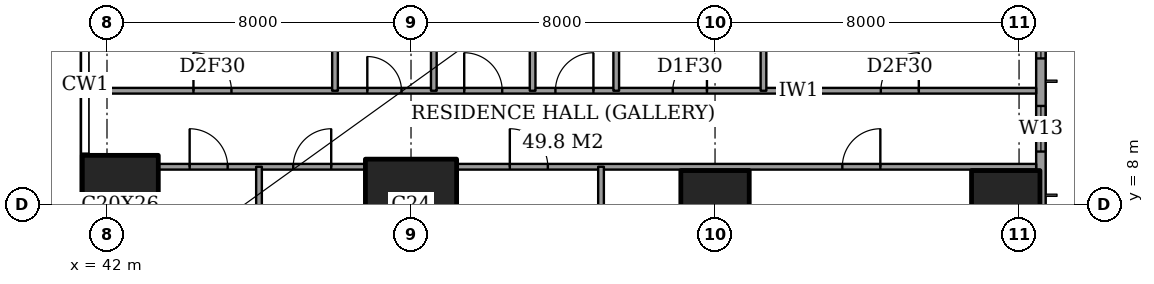
"""IFC4 building model, lengths in metres.
Left out: names, types, materials, properties, quantities, classifications, styles, units other than length and angle.
Written with IfcOpenShell. Run it as: python <this file> out.ifc"""

import sys

from ifc_helpers import new_model, si_unit, direction, frame, frame_2d, origin, origin_2d, place, context, subcontext, project, spatial, rectangle, extrude, element, fill, save


model = new_model("IFC4")
c1 = context("Model", 3, precision=1e-05, world=origin(), true_north=direction((0.0, 1.0)))
c2 = subcontext(c1, "Body", "Model", "MODEL_VIEW")
j1 = project(units=[si_unit("LENGTHUNIT", "METRE"), si_unit("PLANEANGLEUNIT", "RADIAN")], contexts=[c1])
p1 = place(None, origin())
s1 = spatial("IfcSite", under=j1, at=p1, CompositionType="ELEMENT")
p2 = place(p1, origin())
s2 = spatial("IfcBuilding", under=s1, at=p2, CompositionType="ELEMENT")
p3 = place(p2, frame((0.0, 0.0, 221.8)))
s3 = spatial("IfcBuildingStorey", under=s2, at=p3, CompositionType="ELEMENT", Elevation=221.8)
p4 = place(p3, frame((42.35, 8.0, 0.0), z_axis=(0.0, 0.0, 1.0), x_axis=(1.0, 0.0, 0.0)))
e1 = element("IfcColumn", 1, at=p4, inside=s3, PredefinedType="COLUMN", context=c2, shape_type="SweptSolid", body=[
    extrude(rectangle(XDim=2.0, YDim=2.6, at=origin_2d()), origin(), (0.0, 0.0, 1.0), 3.6),
])
p5 = place(p3, frame((50.0, 8.0, 0.0), z_axis=(0.0, 0.0, 1.0), x_axis=(1.0, 0.0, 0.0)))
e2 = element("IfcColumn", 2, at=p5, inside=s3, PredefinedType="COLUMN", context=c2, shape_type="SweptSolid", body=[
    extrude(rectangle(XDim=2.4, YDim=2.4, at=origin_2d()), origin(), (0.0, 0.0, 1.0), 3.6),
])
for number, where, z_axis, x_axis in (
    (3, (58.0, 8.0, 0.0), (0.0, 0.0, 1.0), (1.0, 0.0, 0.0)),
    (4, (65.65, 8.0, 0.0), (0.0, 0.0, 1.0), (1.0, 0.0, 0.0)),
):
    element("IfcColumn", number, at=place(p3, frame(where, z_axis=z_axis, x_axis=x_axis)), inside=s3, PredefinedType="COLUMN", context=c2, shape_type="SweptSolid", body=[
        extrude(rectangle(XDim=1.8, YDim=1.8, at=origin_2d()), origin(), (0.0, 0.0, 1.0), 3.6),
    ])
p6 = place(p3, frame((66.575, 3.175, 0.0), z_axis=(0.0, 0.0, 1.0), x_axis=(0.0, 1.0, 0.0)))
e5 = element("IfcWall", 5, at=p6, inside=s3, PredefinedType="SOLIDWALL", context=c2, shape_type="SweptSolid", body=[
    extrude(rectangle(XDim=41.65, YDim=0.25, at=frame_2d((20.825, 0.0))), origin(), (0.0, 0.0, 1.0), 3.6),
])
p7 = place(p6, frame((0.825, 0.0, 0.2)))
e6 = element("IfcOpeningElement", 6, at=p7, cuts=e5, PredefinedType="OPENING", context=c2, shape_type="SweptSolid", body=[
    extrude(rectangle(XDim=2.4, YDim=2.4, at=frame_2d((1.2, 1.2))), frame((0.0, 0.135, 0.0), z_axis=(0.0, -1.0, 0.0), x_axis=(1.0, 0.0, 0.0)), (0.0, 0.0, 1.0), 0.27),
])
p8 = place(p6, frame((6.225, 0.0, 0.2)))
e7 = element("IfcOpeningElement", 7, at=p8, cuts=e5, PredefinedType="OPENING", context=c2, shape_type="SweptSolid", body=[
    extrude(rectangle(XDim=1.2, YDim=2.4, at=frame_2d((0.6, 1.2))), frame((0.0, 0.135, 0.0), z_axis=(0.0, -1.0, 0.0), x_axis=(1.0, 0.0, 0.0)), (0.0, 0.0, 1.0), 0.27),
])
p9 = place(p6, frame((8.675, 0.0, 0.2)))
e8 = element("IfcOpeningElement", 8, at=p9, cuts=e5, PredefinedType="OPENING", context=c2, shape_type="SweptSolid", body=[
    extrude(rectangle(XDim=2.4, YDim=2.4, at=frame_2d((1.2, 1.2))), frame((0.0, 0.135, 0.0), z_axis=(0.0, -1.0, 0.0), x_axis=(1.0, 0.0, 0.0)), (0.0, 0.0, 1.0), 0.27),
])
p10 = place(p6, frame((15.675, 0.0, 0.2)))
e9 = element("IfcOpeningElement", 9, at=p10, cuts=e5, PredefinedType="OPENING", context=c2, shape_type="SweptSolid", body=[
    extrude(rectangle(XDim=2.4, YDim=2.4, at=frame_2d((1.2, 1.2))), frame((0.0, 0.135, 0.0), z_axis=(0.0, -1.0, 0.0), x_axis=(1.0, 0.0, 0.0)), (0.0, 0.0, 1.0), 0.27),
])
p11 = place(p6, frame((23.575, 0.0, 0.2)))
e10 = element("IfcOpeningElement", 10, at=p11, cuts=e5, PredefinedType="OPENING", context=c2, shape_type="SweptSolid", body=[
    extrude(rectangle(XDim=2.4, YDim=2.4, at=frame_2d((1.2, 1.2))), frame((0.0, 0.135, 0.0), z_axis=(0.0, -1.0, 0.0), x_axis=(1.0, 0.0, 0.0)), (0.0, 0.0, 1.0), 0.27),
])
p12 = place(p6, frame((30.775, 0.0, 0.2)))
e11 = element("IfcOpeningElement", 11, at=p12, cuts=e5, PredefinedType="OPENING", context=c2, shape_type="SweptSolid", body=[
    extrude(rectangle(XDim=2.4, YDim=2.4, at=frame_2d((1.2, 1.2))), frame((0.0, 0.135, 0.0), z_axis=(0.0, -1.0, 0.0), x_axis=(1.0, 0.0, 0.0)), (0.0, 0.0, 1.0), 0.27),
])
p13 = place(p6, frame((34.55, 0.0, 0.2)))
e12 = element("IfcOpeningElement", 12, at=p13, cuts=e5, PredefinedType="OPENING", context=c2, shape_type="SweptSolid", body=[
    extrude(rectangle(XDim=1.2, YDim=2.4, at=frame_2d((0.6, 1.2))), frame((0.0, 0.135, 0.0), z_axis=(0.0, -1.0, 0.0), x_axis=(1.0, 0.0, 0.0)), (0.0, 0.0, 1.0), 0.27),
])
p14 = place(p6, frame((38.425, 0.0, 0.2)))
e13 = element("IfcOpeningElement", 13, at=p14, cuts=e5, PredefinedType="OPENING", context=c2, shape_type="SweptSolid", body=[
    extrude(rectangle(XDim=2.4, YDim=2.4, at=frame_2d((1.2, 1.2))), frame((0.0, 0.135, 0.0), z_axis=(0.0, -1.0, 0.0), x_axis=(1.0, 0.0, 0.0)), (0.0, 0.0, 1.0), 0.27),
])
p15 = place(p3, frame((43.35, 9.0, 0.0), z_axis=(0.0, 0.0, 1.0), x_axis=(1.0, 0.0, 0.0)))
e14 = element("IfcWall", 14, at=p15, inside=s3, PredefinedType="PARTITIONING", context=c2, shape_type="SweptSolid", body=[
    extrude(rectangle(XDim=5.45, YDim=0.15, at=frame_2d((2.725, 0.0))), origin(), (0.0, 0.0, 1.0), 3.25),
])
p16 = place(p15, frame((3.55, 0.0, 0.0)))
e15 = element("IfcOpeningElement", 15, at=p16, cuts=e14, PredefinedType="OPENING", context=c2, shape_type="SweptSolid", body=[
    extrude(rectangle(XDim=1.0, YDim=2.1, at=frame_2d((0.5, 1.05))), frame((0.0, 0.085, 0.0), z_axis=(0.0, -1.0, 0.0), x_axis=(1.0, 0.0, 0.0)), (0.0, 0.0, 1.0), 0.17),
])
p17 = place(p15, frame((0.825, 0.0, 0.0)))
e16 = element("IfcOpeningElement", 16, at=p17, cuts=e14, PredefinedType="OPENING", context=c2, shape_type="SweptSolid", body=[
    extrude(rectangle(XDim=1.0, YDim=2.1, at=frame_2d((0.5, 1.05))), frame((0.0, 0.085, 0.0), z_axis=(0.0, -1.0, 0.0), x_axis=(1.0, 0.0, 0.0)), (0.0, 0.0, 1.0), 0.17),
])
p18 = place(p3, frame((51.2, 9.0, 0.0), z_axis=(0.0, 0.0, 1.0), x_axis=(1.0, 0.0, 0.0)))
e17 = element("IfcWall", 17, at=p18, inside=s3, PredefinedType="PARTITIONING", context=c2, shape_type="SweptSolid", body=[
    extrude(rectangle(XDim=15.25, YDim=0.15, at=frame_2d((7.625, 0.0))), origin(), (0.0, 0.0, 1.0), 3.25),
])
p19 = place(p18, frame((10.15, 0.0, 0.0)))
e18 = element("IfcOpeningElement", 18, at=p19, cuts=e17, PredefinedType="OPENING", context=c2, shape_type="SweptSolid", body=[
    extrude(rectangle(XDim=1.0, YDim=2.1, at=frame_2d((0.5, 1.05))), frame((0.0, 0.085, 0.0), z_axis=(0.0, -1.0, 0.0), x_axis=(1.0, 0.0, 0.0)), (0.0, 0.0, 1.0), 0.17),
])
p20 = place(p18, frame((1.4, 0.0, 0.0)))
e19 = element("IfcOpeningElement", 19, at=p20, cuts=e17, PredefinedType="OPENING", context=c2, shape_type="SweptSolid", body=[
    extrude(rectangle(XDim=1.0, YDim=2.1, at=frame_2d((0.5, 1.05))), frame((0.0, 0.085, 0.0), z_axis=(0.0, -1.0, 0.0), x_axis=(1.0, 0.0, 0.0)), (0.0, 0.0, 1.0), 0.17),
])
p21 = place(p3, frame((41.439, 11.0, 0.0), z_axis=(0.0, 0.0, 1.0), x_axis=(1.0, 0.0, 0.0)))
e20 = element("IfcWall", 20, at=p21, inside=s3, PredefinedType="PARTITIONING", context=c2, shape_type="SweptSolid", body=[
    extrude(rectangle(XDim=25.011, YDim=0.15, at=frame_2d((12.505, 0.0))), origin(), (0.0, 0.0, 1.0), 3.25),
])
p22 = place(p21, frame((12.361, 0.0, 0.0)))
e21 = element("IfcOpeningElement", 21, at=p22, cuts=e20, PredefinedType="OPENING", context=c2, shape_type="SweptSolid", body=[
    extrude(rectangle(XDim=1.0, YDim=2.1, at=frame_2d((0.5, 1.05))), frame((0.0, 0.085, 0.0), z_axis=(0.0, -1.0, 0.0), x_axis=(1.0, 0.0, 0.0)), (0.0, 0.0, 1.0), 0.17),
])
p23 = place(p21, frame((20.924, 0.0, 0.0)))
e22 = element("IfcOpeningElement", 22, at=p23, cuts=e20, PredefinedType="OPENING", context=c2, shape_type="SweptSolid", body=[
    extrude(rectangle(XDim=1.0, YDim=2.1, at=frame_2d((0.5, 1.05))), frame((0.0, 0.085, 0.0), z_axis=(0.0, -1.0, 0.0), x_axis=(1.0, 0.0, 0.0)), (0.0, 0.0, 1.0), 0.17),
])
p24 = place(p21, frame((15.448, 0.0, 0.0)))
e23 = element("IfcOpeningElement", 23, at=p24, cuts=e20, PredefinedType="OPENING", context=c2, shape_type="SweptSolid", body=[
    extrude(rectangle(XDim=0.9, YDim=2.1, at=frame_2d((0.45, 1.05))), frame((0.0, 0.085, 0.0), z_axis=(0.0, -1.0, 0.0), x_axis=(1.0, 0.0, 0.0)), (0.0, 0.0, 1.0), 0.17),
])
p25 = place(p21, frame((9.961, 0.0, 0.0)))
e24 = element("IfcOpeningElement", 24, at=p25, cuts=e20, PredefinedType="OPENING", context=c2, shape_type="SweptSolid", body=[
    extrude(rectangle(XDim=1.0, YDim=2.1, at=frame_2d((0.5, 1.05))), frame((0.0, 0.085, 0.0), z_axis=(0.0, -1.0, 0.0), x_axis=(1.0, 0.0, 0.0)), (0.0, 0.0, 1.0), 0.17),
])
p26 = place(p21, frame((7.411, 0.0, 0.0)))
e25 = element("IfcOpeningElement", 25, at=p26, cuts=e20, PredefinedType="OPENING", context=c2, shape_type="SweptSolid", body=[
    extrude(rectangle(XDim=0.9, YDim=2.1, at=frame_2d((0.45, 1.05))), frame((0.0, 0.085, 0.0), z_axis=(0.0, -1.0, 0.0), x_axis=(1.0, 0.0, 0.0)), (0.0, 0.0, 1.0), 0.17),
])
p27 = place(p21, frame((2.836, 0.0, 0.0)))
e26 = element("IfcOpeningElement", 26, at=p27, cuts=e20, PredefinedType="OPENING", context=c2, shape_type="SweptSolid", body=[
    extrude(rectangle(XDim=1.0, YDim=2.1, at=frame_2d((0.5, 1.05))), frame((0.0, 0.085, 0.0), z_axis=(0.0, -1.0, 0.0), x_axis=(1.0, 0.0, 0.0)), (0.0, 0.0, 1.0), 0.17),
])
p28 = place(p3, frame((46.0, -0.45, 0.0), z_axis=(0.0, 0.0, 1.0), x_axis=(0.0, 1.0, 0.0)))
e27 = element("IfcWall", 27, at=p28, inside=s3, PredefinedType="PARTITIONING", context=c2, shape_type="SweptSolid", body=[
    extrude(rectangle(XDim=9.45, YDim=0.15, at=frame_2d((4.725, 0.0))), origin(), (0.0, 0.0, 1.0), 3.25),
])
p29 = place(p3, frame((48.0, 11.0, 0.0), z_axis=(0.0, 0.0, 1.0), x_axis=(0.0, 1.0, 0.0)))
e28 = element("IfcWall", 28, at=p29, inside=s3, PredefinedType="PARTITIONING", context=c2, shape_type="SweptSolid", body=[
    extrude(rectangle(XDim=6.5, YDim=0.15, at=frame_2d((3.25, 0.0))), origin(), (0.0, 0.0, 1.0), 3.25),
])
p30 = place(p3, frame((50.6, 11.0, 0.0), z_axis=(0.0, 0.0, 1.0), x_axis=(0.0, 1.0, 0.0)))
e29 = element("IfcWall", 29, at=p30, inside=s3, PredefinedType="PARTITIONING", context=c2, shape_type="SweptSolid", body=[
    extrude(rectangle(XDim=3.8, YDim=0.15, at=frame_2d((1.9, 0.0))), origin(), (0.0, 0.0, 1.0), 3.25),
])
p31 = place(p3, frame((53.2, 11.0, 0.0), z_axis=(0.0, 0.0, 1.0), x_axis=(0.0, 1.0, 0.0)))
e30 = element("IfcWall", 30, at=p31, inside=s3, PredefinedType="PARTITIONING", context=c2, shape_type="SweptSolid", body=[
    extrude(rectangle(XDim=6.5, YDim=0.15, at=frame_2d((3.25, 0.0))), origin(), (0.0, 0.0, 1.0), 3.25),
])
p32 = place(p3, frame((55.0, -0.45, 0.0), z_axis=(0.0, 0.0, 1.0), x_axis=(0.0, 1.0, 0.0)))
e31 = element("IfcWall", 31, at=p32, inside=s3, PredefinedType="PARTITIONING", context=c2, shape_type="SweptSolid", body=[
    extrude(rectangle(XDim=9.45, YDim=0.15, at=frame_2d((4.725, 0.0))), origin(), (0.0, 0.0, 1.0), 3.25),
])
p33 = place(p3, frame((55.4, 11.0, 0.0), z_axis=(0.0, 0.0, 1.0), x_axis=(0.0, 1.0, 0.0)))
e32 = element("IfcWall", 32, at=p33, inside=s3, PredefinedType="PARTITIONING", context=c2, shape_type="SweptSolid", body=[
    extrude(rectangle(XDim=10.6, YDim=0.15, at=frame_2d((5.3, 0.0))), origin(), (0.0, 0.0, 1.0), 3.25),
])
p34 = place(p33, frame((8.05, 0.0, 0.0)))
e33 = element("IfcOpeningElement", 33, at=p34, cuts=e32, PredefinedType="OPENING", context=c2, shape_type="SweptSolid", body=[
    extrude(rectangle(XDim=1.0, YDim=2.1, at=frame_2d((0.5, 1.05))), frame((0.0, 0.085, 0.0), z_axis=(0.0, -1.0, 0.0), x_axis=(1.0, 0.0, 0.0)), (0.0, 0.0, 1.0), 0.17),
])
p35 = place(p3, frame((59.275, 11.0, 0.0), z_axis=(0.0, 0.0, 1.0), x_axis=(0.0, 1.0, 0.0)))
e34 = element("IfcWall", 34, at=p35, inside=s3, PredefinedType="PARTITIONING", context=c2, shape_type="SweptSolid", body=[
    extrude(rectangle(XDim=3.8, YDim=0.15, at=frame_2d((1.9, 0.0))), origin(), (0.0, 0.0, 1.0), 3.25),
])
p36 = place(p8, origin())
e35 = element("IfcWindow", 35, at=p36, inside=s3, PartitioningType="SINGLE_PANEL", PredefinedType="WINDOW", context=c2, shape_type="SweptSolid", body=[
    extrude(rectangle(XDim=1.2, YDim=2.4, at=frame_2d((0.6, 1.2))), frame((0.0, 0.03, 0.0), z_axis=(0.0, -1.0, 0.0), x_axis=(1.0, 0.0, 0.0)), (0.0, 0.0, 1.0), 0.06),
])
fill(e7, e35)
p37 = place(p9, origin())
e36 = element("IfcWindow", 36, at=p37, inside=s3, PartitioningType="SINGLE_PANEL", PredefinedType="WINDOW", context=c2, shape_type="SweptSolid", body=[
    extrude(rectangle(XDim=2.4, YDim=2.4, at=frame_2d((1.2, 1.2))), frame((0.0, 0.03, 0.0), z_axis=(0.0, -1.0, 0.0), x_axis=(1.0, 0.0, 0.0)), (0.0, 0.0, 1.0), 0.06),
])
fill(e8, e36)
p38 = place(p19, origin())
e37 = element("IfcDoor", 37, at=p38, inside=s3, OperationType="SINGLE_SWING_LEFT", PredefinedType="DOOR", context=c2, shape_type="SweptSolid", body=[
    extrude(rectangle(XDim=1.0, YDim=2.1, at=frame_2d((0.5, 1.05))), frame((0.0, 0.025, 0.0), z_axis=(0.0, -1.0, 0.0), x_axis=(1.0, 0.0, 0.0)), (0.0, 0.0, 1.0), 0.05),
])
fill(e18, e37)
p39 = place(p20, origin())
e38 = element("IfcDoor", 38, at=p39, inside=s3, OperationType="SINGLE_SWING_RIGHT", PredefinedType="DOOR", context=c2, shape_type="SweptSolid", body=[
    extrude(rectangle(XDim=1.0, YDim=2.1, at=frame_2d((0.5, 1.05))), frame((0.0, 0.025, 0.0), z_axis=(0.0, -1.0, 0.0), x_axis=(1.0, 0.0, 0.0)), (0.0, 0.0, 1.0), 0.05),
])
fill(e19, e38)
p40 = place(p16, origin())
e39 = element("IfcDoor", 39, at=p40, inside=s3, OperationType="SINGLE_SWING_LEFT", PredefinedType="DOOR", context=c2, shape_type="SweptSolid", body=[
    extrude(rectangle(XDim=1.0, YDim=2.1, at=frame_2d((0.5, 1.05))), frame((0.0, 0.025, 0.0), z_axis=(0.0, -1.0, 0.0), x_axis=(1.0, 0.0, 0.0)), (0.0, 0.0, 1.0), 0.05),
])
fill(e15, e39)
p41 = place(p17, origin())
e40 = element("IfcDoor", 40, at=p41, inside=s3, OperationType="SINGLE_SWING_RIGHT", PredefinedType="DOOR", context=c2, shape_type="SweptSolid", body=[
    extrude(rectangle(XDim=1.0, YDim=2.1, at=frame_2d((0.5, 1.05))), frame((0.0, 0.025, 0.0), z_axis=(0.0, -1.0, 0.0), x_axis=(1.0, 0.0, 0.0)), (0.0, 0.0, 1.0), 0.05),
])
fill(e16, e40)
p42 = place(p22, origin())
e41 = element("IfcDoor", 41, at=p42, inside=s3, OperationType="SINGLE_SWING_LEFT", PredefinedType="DOOR", context=c2, shape_type="SweptSolid", body=[
    extrude(rectangle(XDim=1.0, YDim=2.1, at=frame_2d((0.5, 1.05))), frame((0.0, 0.025, 0.0), z_axis=(0.0, -1.0, 0.0), x_axis=(1.0, 0.0, 0.0)), (0.0, 0.0, 1.0), 0.05),
])
fill(e21, e41)
p43 = place(p23, origin())
e42 = element("IfcDoor", 42, at=p43, inside=s3, OperationType="SINGLE_SWING_LEFT", PredefinedType="DOOR", context=c2, shape_type="SweptSolid", body=[
    extrude(rectangle(XDim=1.0, YDim=2.1, at=frame_2d((0.5, 1.05))), frame((0.0, 0.025, 0.0), z_axis=(0.0, -1.0, 0.0), x_axis=(1.0, 0.0, 0.0)), (0.0, 0.0, 1.0), 0.05),
])
fill(e22, e42)
p44 = place(p24, origin())
e43 = element("IfcDoor", 43, at=p44, inside=s3, OperationType="SINGLE_SWING_LEFT", PredefinedType="DOOR", context=c2, shape_type="SweptSolid", body=[
    extrude(rectangle(XDim=0.9, YDim=2.1, at=frame_2d((0.45, 1.05))), frame((0.0, 0.025, 0.0), z_axis=(0.0, -1.0, 0.0), x_axis=(1.0, 0.0, 0.0)), (0.0, 0.0, 1.0), 0.05),
])
fill(e23, e43)
p45 = place(p25, origin())
e44 = element("IfcDoor", 44, at=p45, inside=s3, OperationType="SINGLE_SWING_RIGHT", PredefinedType="DOOR", context=c2, shape_type="SweptSolid", body=[
    extrude(rectangle(XDim=1.0, YDim=2.1, at=frame_2d((0.5, 1.05))), frame((0.0, 0.025, 0.0), z_axis=(0.0, -1.0, 0.0), x_axis=(1.0, 0.0, 0.0)), (0.0, 0.0, 1.0), 0.05),
])
fill(e24, e44)
p46 = place(p26, origin())
e45 = element("IfcDoor", 45, at=p46, inside=s3, OperationType="SINGLE_SWING_RIGHT", PredefinedType="DOOR", context=c2, shape_type="SweptSolid", body=[
    extrude(rectangle(XDim=0.9, YDim=2.1, at=frame_2d((0.45, 1.05))), frame((0.0, 0.025, 0.0), z_axis=(0.0, -1.0, 0.0), x_axis=(1.0, 0.0, 0.0)), (0.0, 0.0, 1.0), 0.05),
])
fill(e25, e45)
p47 = place(p27, origin())
e46 = element("IfcDoor", 46, at=p47, inside=s3, OperationType="SINGLE_SWING_RIGHT", PredefinedType="DOOR", context=c2, shape_type="SweptSolid", body=[
    extrude(rectangle(XDim=1.0, YDim=2.1, at=frame_2d((0.5, 1.05))), frame((0.0, 0.025, 0.0), z_axis=(0.0, -1.0, 0.0), x_axis=(1.0, 0.0, 0.0)), (0.0, 0.0, 1.0), 0.05),
])
fill(e26, e46)
save(model, sys.argv[1])
